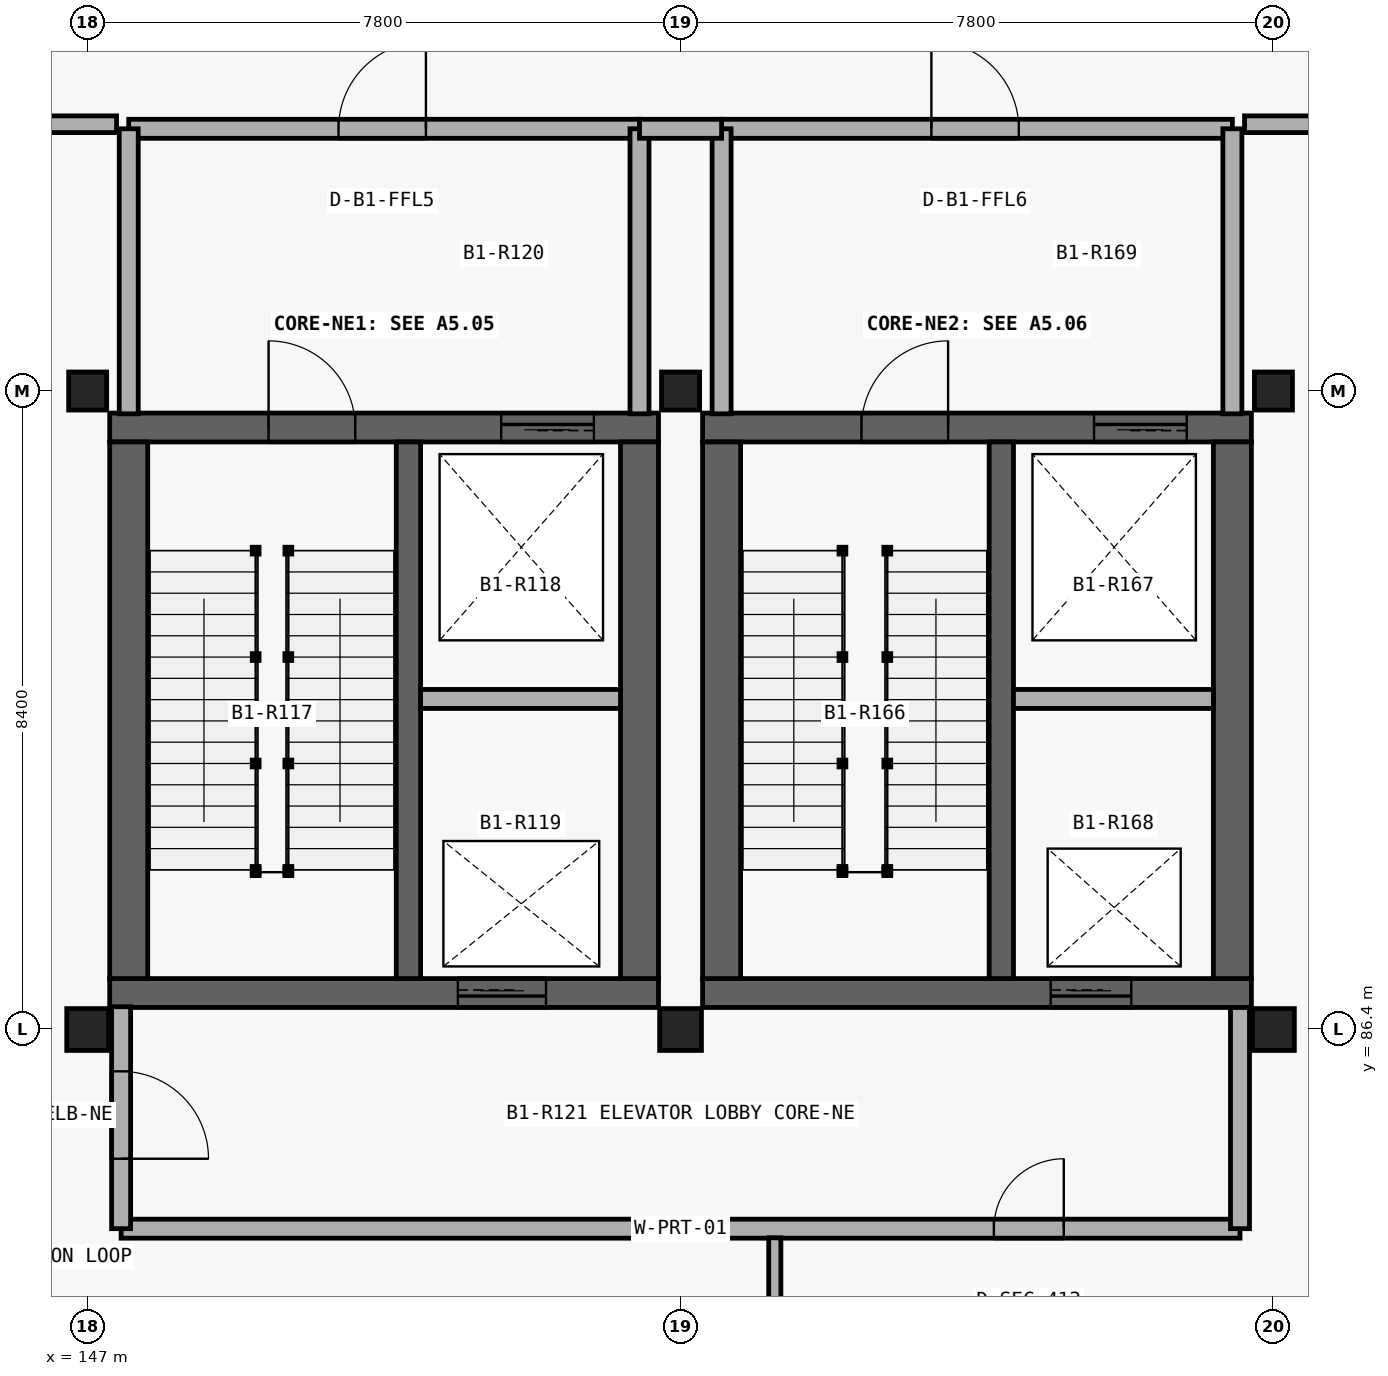
"""IFC4 building model, lengths in metres.
Left out: names, types, materials, properties, quantities, classifications, styles, units other than length and angle.
Written with IfcOpenShell. Run it as: python <this file> out.ifc"""

import sys

from ifc_helpers import new_model, si_unit, direction, frame, frame_2d, origin_with_axes, origin_2d_with_axis, place, context, subcontext, project, spatial, rectangle, i_section, extrude, element, fill, save


model = new_model("IFC4")
c1 = context("Model", 3, precision=1e-05, world=origin_with_axes(), true_north=direction((0.0, 1.0)))
c2 = subcontext(c1, "Body", "Model", "MODEL_VIEW")
j1 = project(units=[si_unit("LENGTHUNIT", "METRE"), si_unit("PLANEANGLEUNIT", "RADIAN")], contexts=[c1])
p1 = place(None, origin_with_axes())
s1 = spatial("IfcSite", under=j1, at=p1, CompositionType="ELEMENT")
p2 = place(p1, origin_with_axes())
s2 = spatial("IfcBuilding", under=s1, at=p2, CompositionType="ELEMENT")
p3 = place(p2, frame((0.0, 0.0, -4.8), z_axis=(0.0, 0.0, 1.0), x_axis=(1.0, 0.0, 0.0)))
s3 = spatial("IfcBuildingStorey", under=s2, at=p3, CompositionType="ELEMENT", Elevation=-4.8)
p4 = place(None, frame((147.29, 86.88, -5.35), z_axis=(0.0, 0.0, 1.0), x_axis=(1.0, 0.0, 0.0)))
e1 = element("IfcWall", 1, at=p4, inside=s3, PredefinedType="SHEAR", context=c2, shape_type="SweptSolid", body=[
    extrude(rectangle(XDim=7.22, YDim=0.38, at=frame_2d((3.61, 0.0), x_axis=(1.0, 0.0))), origin_with_axes(), (0.0, 0.0, 1.0), 5.35),
])
p5 = place(None, frame((152.45, 86.88, -4.8), z_axis=(0.0, 0.0, 1.0), x_axis=(1.0, 0.0, 0.0)))
e2 = element("IfcOpeningElement", 2, at=p5, cuts=e1, PredefinedType="OPENING", context=c2, shape_type="SweptSolid", body=[
    extrude(rectangle(XDim=1.16, YDim=2.2, at=frame_2d((0.0, 1.1), x_axis=(1.0, 0.0))), frame((0.0, 0.2, 0.0), z_axis=(0.0, -1.0, 0.0), x_axis=(1.0, 0.0, 0.0)), (0.0, 0.0, 1.0), 0.4),
])
p6 = place(None, frame((154.51, 94.32, -5.35), z_axis=(0.0, 0.0, 1.0), x_axis=(-1.0, 0.0, 0.0)))
e3 = element("IfcWall", 3, at=p6, inside=s3, PredefinedType="SHEAR", context=c2, shape_type="SweptSolid", body=[
    extrude(rectangle(XDim=7.22, YDim=0.38, at=frame_2d((3.61, 0.0), x_axis=(1.0, 0.0))), origin_with_axes(), (0.0, 0.0, 1.0), 5.35),
])
p7 = place(None, frame((149.95, 94.32, -4.8), z_axis=(0.0, 0.0, 1.0), x_axis=(-1.0, 0.0, 0.0)))
e4 = element("IfcOpeningElement", 4, at=p7, cuts=e3, PredefinedType="OPENING", context=c2, shape_type="SweptSolid", body=[
    extrude(rectangle(XDim=1.14, YDim=2.18, at=frame_2d((0.0, 1.09), x_axis=(1.0, 0.0))), frame((0.0, 0.2, 0.0), z_axis=(0.0, -1.0, 0.0), x_axis=(1.0, 0.0, 0.0)), (0.0, 0.0, 1.0), 0.4),
])
p8 = place(None, frame((153.05, 94.32, -4.8), z_axis=(0.0, 0.0, 1.0), x_axis=(-1.0, 0.0, 0.0)))
e5 = element("IfcOpeningElement", 5, at=p8, cuts=e3, PredefinedType="OPENING", context=c2, shape_type="SweptSolid", body=[
    extrude(rectangle(XDim=1.22, YDim=2.28, at=frame_2d((0.0, 1.14), x_axis=(1.0, 0.0))), frame((0.0, 0.2, 0.0), z_axis=(0.0, -1.0, 0.0), x_axis=(1.0, 0.0, 0.0)), (0.0, 0.0, 1.0), 0.4),
])
for number, where, z_axis, x_axis in (
    (6, (154.26, 87.07, -5.35), (0.0, 0.0, 1.0), (0.0, 1.0, 0.0)),
    (7, (147.54, 94.13, -5.35), (0.0, 0.0, 1.0), (0.0, -1.0, 0.0)),
):
    element("IfcWall", number, at=place(None, frame(where, z_axis=z_axis, x_axis=x_axis)), inside=s3, PredefinedType="SHEAR", context=c2, shape_type="SweptSolid", body=[
        extrude(rectangle(XDim=7.06, YDim=0.5, at=frame_2d((3.53, 0.0), x_axis=(1.0, 0.0))), origin_with_axes(), (0.0, 0.0, 1.0), 5.35),
    ])
p9 = place(None, frame((151.22, 87.07, -5.35), z_axis=(0.0, 0.0, 1.0), x_axis=(0.0, 1.0, 0.0)))
e8 = element("IfcWall", 8, at=p9, inside=s3, PredefinedType="SHEAR", context=c2, shape_type="SweptSolid", body=[
    extrude(rectangle(XDim=7.06, YDim=0.32, at=frame_2d((3.53, 0.0), x_axis=(1.0, 0.0))), origin_with_axes(), (0.0, 0.0, 1.0), 5.35),
])
p10 = place(None, frame((151.38, 90.749, -4.8), z_axis=(0.0, 0.0, 1.0), x_axis=(1.0, 0.0, 0.0)))
e9 = element("IfcWall", 9, at=p10, inside=s3, PredefinedType="PARTITIONING", context=c2, shape_type="SweptSolid", body=[
    extrude(rectangle(XDim=2.63, YDim=0.25, at=frame_2d((1.315, 0.0), x_axis=(1.0, 0.0))), origin_with_axes(), (0.0, 0.0, 1.0), 4.44),
])
p11 = place(None, frame((154.26, 98.25, -4.8), z_axis=(0.0, 0.0, 1.0), x_axis=(-1.0, 0.0, 0.0)))
e10 = element("IfcWall", 10, at=p11, inside=s3, PredefinedType="PARTITIONING", context=c2, shape_type="SweptSolid", body=[
    extrude(rectangle(XDim=6.72, YDim=0.25, at=frame_2d((3.36, 0.0), x_axis=(1.0, 0.0))), origin_with_axes(), (0.0, 0.0, 1.0), 4.44),
])
p12 = place(None, frame((150.875, 98.25, -4.8), z_axis=(0.0, 0.0, 1.0), x_axis=(-1.0, 0.0, 0.0)))
e11 = element("IfcOpeningElement", 11, at=p12, cuts=e10, PredefinedType="OPENING", context=c2, shape_type="SweptSolid", body=[
    extrude(rectangle(XDim=1.15, YDim=2.25, at=frame_2d((0.0, 1.125), x_axis=(1.0, 0.0))), frame((0.0, 0.135, 0.0), z_axis=(0.0, -1.0, 0.0), x_axis=(1.0, 0.0, 0.0)), (0.0, 0.0, 1.0), 0.27),
])
for number, where, z_axis, x_axis in (
    (12, (147.54, 94.5, -4.8), (0.0, 0.0, 1.0), (0.0, 1.0, 0.0)),
    (13, (154.26, 94.5, -4.8), (0.0, 0.0, 1.0), (0.0, 1.0, 0.0)),
):
    element("IfcWall", number, at=place(None, frame(where, z_axis=z_axis, x_axis=x_axis)), inside=s3, PredefinedType="PARTITIONING", context=c2, shape_type="SweptSolid", body=[
        extrude(rectangle(XDim=3.75, YDim=0.25, at=frame_2d((1.875, 0.0), x_axis=(1.0, 0.0))), origin_with_axes(), (0.0, 0.0, 1.0), 4.44),
    ])
p13 = place(None, frame((147.44, 83.78, -4.8), z_axis=(0.0, 0.0, 1.0), x_axis=(1.0, 0.0, 0.0)))
e14 = element("IfcWall", 14, at=p13, inside=s3, PredefinedType="PARTITIONING", context=c2, shape_type="SweptSolid", body=[
    extrude(rectangle(XDim=14.72, YDim=0.25, at=frame_2d((7.36, 0.0), x_axis=(1.0, 0.0))), origin_with_axes(), (0.0, 0.0, 1.0), 4.1),
])
p14 = place(None, frame((159.382, 83.78, -4.8), z_axis=(0.0, 0.0, 1.0), x_axis=(1.0, 0.0, 0.0)))
e15 = element("IfcOpeningElement", 15, at=p14, cuts=e14, PredefinedType="OPENING", context=c2, shape_type="SweptSolid", body=[
    extrude(rectangle(XDim=0.92, YDim=2.14, at=frame_2d((0.0, 1.07), x_axis=(1.0, 0.0))), frame((0.0, 0.135, 0.0), z_axis=(0.0, -1.0, 0.0), x_axis=(1.0, 0.0, 0.0)), (0.0, 0.0, 1.0), 0.27),
])
p15 = place(None, frame((162.16, 83.78, -4.8), z_axis=(0.0, 0.0, 1.0), x_axis=(0.0, 1.0, 0.0)))
e16 = element("IfcWall", 16, at=p15, inside=s3, PredefinedType="PARTITIONING", context=c2, shape_type="SweptSolid", body=[
    extrude(rectangle(XDim=2.92, YDim=0.25, at=frame_2d((1.46, 0.0), x_axis=(1.0, 0.0))), origin_with_axes(), (0.0, 0.0, 1.0), 4.44),
])
p16 = place(None, frame((147.44, 86.7, -4.8), z_axis=(0.0, 0.0, 1.0), x_axis=(0.0, -1.0, 0.0)))
e17 = element("IfcWall", 17, at=p16, inside=s3, PredefinedType="PARTITIONING", context=c2, shape_type="SweptSolid", body=[
    extrude(rectangle(XDim=2.92, YDim=0.25, at=frame_2d((1.46, 0.0), x_axis=(1.0, 0.0))), origin_with_axes(), (0.0, 0.0, 1.0), 4.44),
])
p17 = place(None, frame((147.44, 85.275, -4.8), z_axis=(0.0, 0.0, 1.0), x_axis=(0.0, -1.0, 0.0)))
e18 = element("IfcOpeningElement", 18, at=p17, cuts=e17, PredefinedType="OPENING", context=c2, shape_type="SweptSolid", body=[
    extrude(rectangle(XDim=1.15, YDim=2.25, at=frame_2d((0.0, 1.125), x_axis=(1.0, 0.0))), frame((0.0, 0.135, 0.0), z_axis=(0.0, -1.0, 0.0), x_axis=(1.0, 0.0, 0.0)), (0.0, 0.0, 1.0), 0.27),
])
p18 = place(None, frame((155.09, 86.88, -5.35), z_axis=(0.0, 0.0, 1.0), x_axis=(1.0, 0.0, 0.0)))
e19 = element("IfcWall", 19, at=p18, inside=s3, PredefinedType="SHEAR", context=c2, shape_type="SweptSolid", body=[
    extrude(rectangle(XDim=7.22, YDim=0.38, at=frame_2d((3.61, 0.0), x_axis=(1.0, 0.0))), origin_with_axes(), (0.0, 0.0, 1.0), 5.35),
])
p19 = place(None, frame((160.2, 86.88, -4.8), z_axis=(0.0, 0.0, 1.0), x_axis=(1.0, 0.0, 0.0)))
e20 = element("IfcOpeningElement", 20, at=p19, cuts=e19, PredefinedType="OPENING", context=c2, shape_type="SweptSolid", body=[
    extrude(rectangle(XDim=1.06, YDim=2.16, at=frame_2d((0.0, 1.08), x_axis=(1.0, 0.0))), frame((0.0, 0.2, 0.0), z_axis=(0.0, -1.0, 0.0), x_axis=(1.0, 0.0, 0.0)), (0.0, 0.0, 1.0), 0.4),
])
p20 = place(None, frame((162.31, 94.32, -5.35), z_axis=(0.0, 0.0, 1.0), x_axis=(-1.0, 0.0, 0.0)))
e21 = element("IfcWall", 21, at=p20, inside=s3, PredefinedType="SHEAR", context=c2, shape_type="SweptSolid", body=[
    extrude(rectangle(XDim=7.22, YDim=0.38, at=frame_2d((3.61, 0.0), x_axis=(1.0, 0.0))), origin_with_axes(), (0.0, 0.0, 1.0), 5.35),
])
p21 = place(None, frame((157.75, 94.32, -4.8), z_axis=(0.0, 0.0, 1.0), x_axis=(-1.0, 0.0, 0.0)))
e22 = element("IfcOpeningElement", 22, at=p21, cuts=e21, PredefinedType="OPENING", context=c2, shape_type="SweptSolid", body=[
    extrude(rectangle(XDim=1.14, YDim=2.18, at=frame_2d((0.0, 1.09), x_axis=(1.0, 0.0))), frame((0.0, 0.2, 0.0), z_axis=(0.0, -1.0, 0.0), x_axis=(1.0, 0.0, 0.0)), (0.0, 0.0, 1.0), 0.4),
])
p22 = place(None, frame((160.85, 94.32, -4.8), z_axis=(0.0, 0.0, 1.0), x_axis=(-1.0, 0.0, 0.0)))
e23 = element("IfcOpeningElement", 23, at=p22, cuts=e21, PredefinedType="OPENING", context=c2, shape_type="SweptSolid", body=[
    extrude(rectangle(XDim=1.22, YDim=2.28, at=frame_2d((0.0, 1.14), x_axis=(1.0, 0.0))), frame((0.0, 0.2, 0.0), z_axis=(0.0, -1.0, 0.0), x_axis=(1.0, 0.0, 0.0)), (0.0, 0.0, 1.0), 0.4),
])
for number, where, z_axis, x_axis in (
    (24, (162.06, 87.07, -5.35), (0.0, 0.0, 1.0), (0.0, 1.0, 0.0)),
    (25, (155.34, 94.13, -5.35), (0.0, 0.0, 1.0), (0.0, -1.0, 0.0)),
):
    element("IfcWall", number, at=place(None, frame(where, z_axis=z_axis, x_axis=x_axis)), inside=s3, PredefinedType="SHEAR", context=c2, shape_type="SweptSolid", body=[
        extrude(rectangle(XDim=7.06, YDim=0.5, at=frame_2d((3.53, 0.0), x_axis=(1.0, 0.0))), origin_with_axes(), (0.0, 0.0, 1.0), 5.35),
    ])
p23 = place(None, frame((159.02, 87.07, -5.35), z_axis=(0.0, 0.0, 1.0), x_axis=(0.0, 1.0, 0.0)))
e26 = element("IfcWall", 26, at=p23, inside=s3, PredefinedType="SHEAR", context=c2, shape_type="SweptSolid", body=[
    extrude(rectangle(XDim=7.06, YDim=0.32, at=frame_2d((3.53, 0.0), x_axis=(1.0, 0.0))), origin_with_axes(), (0.0, 0.0, 1.0), 5.35),
])
p24 = place(None, frame((159.18, 90.749, -4.8), z_axis=(0.0, 0.0, 1.0), x_axis=(1.0, 0.0, 0.0)))
e27 = element("IfcWall", 27, at=p24, inside=s3, PredefinedType="PARTITIONING", context=c2, shape_type="SweptSolid", body=[
    extrude(rectangle(XDim=2.63, YDim=0.25, at=frame_2d((1.315, 0.0), x_axis=(1.0, 0.0))), origin_with_axes(), (0.0, 0.0, 1.0), 4.44),
])
p25 = place(None, frame((162.06, 98.25, -4.8), z_axis=(0.0, 0.0, 1.0), x_axis=(-1.0, 0.0, 0.0)))
e28 = element("IfcWall", 28, at=p25, inside=s3, PredefinedType="PARTITIONING", context=c2, shape_type="SweptSolid", body=[
    extrude(rectangle(XDim=6.72, YDim=0.25, at=frame_2d((3.36, 0.0), x_axis=(1.0, 0.0))), origin_with_axes(), (0.0, 0.0, 1.0), 4.44),
])
p26 = place(None, frame((158.675, 98.25, -4.8), z_axis=(0.0, 0.0, 1.0), x_axis=(-1.0, 0.0, 0.0)))
e29 = element("IfcOpeningElement", 29, at=p26, cuts=e28, PredefinedType="OPENING", context=c2, shape_type="SweptSolid", body=[
    extrude(rectangle(XDim=1.15, YDim=2.25, at=frame_2d((0.0, 1.125), x_axis=(1.0, 0.0))), frame((0.0, 0.135, 0.0), z_axis=(0.0, -1.0, 0.0), x_axis=(1.0, 0.0, 0.0)), (0.0, 0.0, 1.0), 0.27),
])
for number, where, z_axis, x_axis in (
    (30, (155.34, 94.5, -4.8), (0.0, 0.0, 1.0), (0.0, 1.0, 0.0)),
    (31, (162.06, 94.5, -4.8), (0.0, 0.0, 1.0), (0.0, 1.0, 0.0)),
):
    element("IfcWall", number, at=place(None, frame(where, z_axis=z_axis, x_axis=x_axis)), inside=s3, PredefinedType="PARTITIONING", context=c2, shape_type="SweptSolid", body=[
        extrude(rectangle(XDim=3.75, YDim=0.25, at=frame_2d((1.875, 0.0), x_axis=(1.0, 0.0))), origin_with_axes(), (0.0, 0.0, 1.0), 4.44),
    ])
p27 = place(None, frame((154.26, 98.25, -4.8), z_axis=(0.0, 0.0, 1.0), x_axis=(1.0, 0.0, 0.0)))
e32 = element("IfcWall", 32, at=p27, inside=s3, PredefinedType="PARTITIONING", context=c2, shape_type="SweptSolid", body=[
    extrude(rectangle(XDim=1.08, YDim=0.25, at=frame_2d((0.54, 0.0), x_axis=(1.0, 0.0))), origin_with_axes(), (0.0, 0.0, 1.0), 4.44),
])
p28 = place(None, frame((145.7, 98.31, -4.8), z_axis=(0.0, 0.0, 1.0), x_axis=(1.0, 0.0, 0.0)))
e33 = element("IfcWall", 33, at=p28, inside=s3, PredefinedType="PARTITIONING", context=c2, shape_type="SweptSolid", body=[
    extrude(rectangle(XDim=1.68, YDim=0.22, at=frame_2d((0.84, 0.0), x_axis=(1.0, 0.0))), origin_with_axes(), (0.0, 0.0, 1.0), 4.44),
])
p29 = place(None, frame((162.22, 98.31, -4.8), z_axis=(0.0, 0.0, 1.0), x_axis=(1.0, 0.0, 0.0)))
e34 = element("IfcWall", 34, at=p29, inside=s3, PredefinedType="PARTITIONING", context=c2, shape_type="SweptSolid", body=[
    extrude(rectangle(XDim=7.04, YDim=0.22, at=frame_2d((3.52, 0.0), x_axis=(1.0, 0.0))), origin_with_axes(), (0.0, 0.0, 1.0), 4.44),
])
p30 = place(None, frame((156.04, 29.49, -4.8), z_axis=(0.0, 0.0, 1.0), x_axis=(0.0, 1.0, 0.0)))
e35 = element("IfcWall", 35, at=p30, inside=s3, PredefinedType="PARTITIONING", context=c2, shape_type="SweptSolid", body=[
    extrude(rectangle(XDim=54.17, YDim=0.16, at=frame_2d((27.085, 0.0), x_axis=(1.0, 0.0))), origin_with_axes(), (0.0, 0.0, 1.0), 4.44),
])
p31 = place(None, frame((147.0, 86.4, -5.35), z_axis=(0.0, 0.0, 1.0), x_axis=(1.0, 0.0, 0.0)))
e36 = element("IfcColumn", 36, at=p31, inside=s3, PredefinedType="COLUMN", context=c2, shape_type="SweptSolid", body=[
    extrude(i_section(OverallWidth=0.55, OverallDepth=0.55, WebThickness=0.025, FlangeThickness=0.042, at=origin_2d_with_axis()), origin_with_axes(), (0.0, 0.0, 1.0), 5.35),
])
p32 = place(None, frame((147.0, 94.8, -5.35), z_axis=(0.0, 0.0, 1.0), x_axis=(1.0, 0.0, 0.0)))
e37 = element("IfcColumn", 37, at=p32, inside=s3, PredefinedType="COLUMN", context=c2, shape_type="SweptSolid", body=[
    extrude(i_section(OverallWidth=0.5, OverallDepth=0.5, WebThickness=0.022, FlangeThickness=0.036, at=origin_2d_with_axis()), origin_with_axes(), (0.0, 0.0, 1.0), 5.35),
])
p33 = place(None, frame((154.8, 86.4, -5.35), z_axis=(0.0, 0.0, 1.0), x_axis=(1.0, 0.0, 0.0)))
e38 = element("IfcColumn", 38, at=p33, inside=s3, PredefinedType="COLUMN", context=c2, shape_type="SweptSolid", body=[
    extrude(i_section(OverallWidth=0.55, OverallDepth=0.55, WebThickness=0.025, FlangeThickness=0.042, at=origin_2d_with_axis()), origin_with_axes(), (0.0, 0.0, 1.0), 5.35),
])
p34 = place(None, frame((154.8, 94.8, -5.35), z_axis=(0.0, 0.0, 1.0), x_axis=(1.0, 0.0, 0.0)))
e39 = element("IfcColumn", 39, at=p34, inside=s3, PredefinedType="COLUMN", context=c2, shape_type="SweptSolid", body=[
    extrude(i_section(OverallWidth=0.5, OverallDepth=0.5, WebThickness=0.022, FlangeThickness=0.036, at=origin_2d_with_axis()), origin_with_axes(), (0.0, 0.0, 1.0), 5.35),
])
p35 = place(None, frame((162.6, 86.4, -5.35), z_axis=(0.0, 0.0, 1.0), x_axis=(1.0, 0.0, 0.0)))
e40 = element("IfcColumn", 40, at=p35, inside=s3, PredefinedType="COLUMN", context=c2, shape_type="SweptSolid", body=[
    extrude(i_section(OverallWidth=0.55, OverallDepth=0.55, WebThickness=0.025, FlangeThickness=0.042, at=origin_2d_with_axis()), origin_with_axes(), (0.0, 0.0, 1.0), 5.35),
])
p36 = place(None, frame((162.6, 94.8, -5.35), z_axis=(0.0, 0.0, 1.0), x_axis=(1.0, 0.0, 0.0)))
e41 = element("IfcColumn", 41, at=p36, inside=s3, PredefinedType="COLUMN", context=c2, shape_type="SweptSolid", body=[
    extrude(i_section(OverallWidth=0.5, OverallDepth=0.5, WebThickness=0.022, FlangeThickness=0.036, at=origin_2d_with_axis()), origin_with_axes(), (0.0, 0.0, 1.0), 5.35),
])
p37 = place(None, frame((149.95, 94.32, -4.8), z_axis=(0.0, 0.0, 1.0), x_axis=(1.0, 0.0, 0.0)))
e42 = element("IfcDoor", 42, at=p37, inside=s3, OperationType="SINGLE_SWING_RIGHT", PredefinedType="DOOR", context=c2, shape_type="SweptSolid", body=[
    extrude(rectangle(XDim=1.14, YDim=2.18, at=frame_2d((0.0, 1.09), x_axis=(1.0, 0.0))), frame((0.0, 0.04, 0.0), z_axis=(0.0, -1.0, 0.0), x_axis=(1.0, 0.0, 0.0)), (0.0, 0.0, 1.0), 0.08),
])
fill(e4, e42)
p38 = place(None, frame((153.05, 94.32, -4.8), z_axis=(0.0, 0.0, 1.0), x_axis=(1.0, 0.0, 0.0)))
e43 = element("IfcDoor", 43, at=p38, inside=s3, OperationType="SLIDING_TO_LEFT", PredefinedType="DOOR", context=c2, shape_type="SweptSolid", body=[
    extrude(rectangle(XDim=1.22, YDim=2.28, at=frame_2d((0.0, 1.14), x_axis=(1.0, 0.0))), frame((0.0, 0.04, 0.0), z_axis=(0.0, -1.0, 0.0), x_axis=(1.0, 0.0, 0.0)), (0.0, 0.0, 1.0), 0.08),
])
fill(e5, e43)
p39 = place(None, frame((152.45, 86.88, -4.8), z_axis=(0.0, 0.0, 1.0), x_axis=(-1.0, 0.0, 0.0)))
e44 = element("IfcDoor", 44, at=p39, inside=s3, OperationType="SLIDING_TO_LEFT", PredefinedType="DOOR", context=c2, shape_type="SweptSolid", body=[
    extrude(rectangle(XDim=1.16, YDim=2.2, at=frame_2d((0.0, 1.1), x_axis=(1.0, 0.0))), frame((0.0, 0.04, 0.0), z_axis=(0.0, -1.0, 0.0), x_axis=(1.0, 0.0, 0.0)), (0.0, 0.0, 1.0), 0.08),
])
fill(e2, e44)
p40 = place(None, frame((150.875, 98.25, -4.8), z_axis=(0.0, 0.0, 1.0), x_axis=(1.0, 0.0, 0.0)))
e45 = element("IfcDoor", 45, at=p40, inside=s3, OperationType="SINGLE_SWING_LEFT", PredefinedType="DOOR", context=c2, shape_type="SweptSolid", body=[
    extrude(rectangle(XDim=1.15, YDim=2.25, at=frame_2d((0.0, 1.125), x_axis=(1.0, 0.0))), frame((0.0, 0.04, 0.0), z_axis=(0.0, -1.0, 0.0), x_axis=(1.0, 0.0, 0.0)), (0.0, 0.0, 1.0), 0.08),
])
fill(e11, e45)
p41 = place(None, frame((147.44, 85.275, -4.8), z_axis=(0.0, 0.0, 1.0), x_axis=(0.0, -1.0, 0.0)))
e46 = element("IfcDoor", 46, at=p41, inside=s3, OperationType="SINGLE_SWING_RIGHT", PredefinedType="DOOR", context=c2, shape_type="SweptSolid", body=[
    extrude(rectangle(XDim=1.15, YDim=2.25, at=frame_2d((0.0, 1.125), x_axis=(1.0, 0.0))), frame((0.0, 0.04, 0.0), z_axis=(0.0, -1.0, 0.0), x_axis=(1.0, 0.0, 0.0)), (0.0, 0.0, 1.0), 0.08),
])
fill(e18, e46)
p42 = place(None, frame((157.75, 94.32, -4.8), z_axis=(0.0, 0.0, 1.0), x_axis=(1.0, 0.0, 0.0)))
e47 = element("IfcDoor", 47, at=p42, inside=s3, OperationType="SINGLE_SWING_LEFT", PredefinedType="DOOR", context=c2, shape_type="SweptSolid", body=[
    extrude(rectangle(XDim=1.14, YDim=2.18, at=frame_2d((0.0, 1.09), x_axis=(1.0, 0.0))), frame((0.0, 0.04, 0.0), z_axis=(0.0, -1.0, 0.0), x_axis=(1.0, 0.0, 0.0)), (0.0, 0.0, 1.0), 0.08),
])
fill(e22, e47)
p43 = place(None, frame((160.85, 94.32, -4.8), z_axis=(0.0, 0.0, 1.0), x_axis=(1.0, 0.0, 0.0)))
e48 = element("IfcDoor", 48, at=p43, inside=s3, OperationType="SLIDING_TO_LEFT", PredefinedType="DOOR", context=c2, shape_type="SweptSolid", body=[
    extrude(rectangle(XDim=1.22, YDim=2.28, at=frame_2d((0.0, 1.14), x_axis=(1.0, 0.0))), frame((0.0, 0.04, 0.0), z_axis=(0.0, -1.0, 0.0), x_axis=(1.0, 0.0, 0.0)), (0.0, 0.0, 1.0), 0.08),
])
fill(e23, e48)
p44 = place(None, frame((160.2, 86.88, -4.8), z_axis=(0.0, 0.0, 1.0), x_axis=(-1.0, 0.0, 0.0)))
e49 = element("IfcDoor", 49, at=p44, inside=s3, OperationType="SLIDING_TO_LEFT", PredefinedType="DOOR", context=c2, shape_type="SweptSolid", body=[
    extrude(rectangle(XDim=1.06, YDim=2.16, at=frame_2d((0.0, 1.08), x_axis=(1.0, 0.0))), frame((0.0, 0.04, 0.0), z_axis=(0.0, -1.0, 0.0), x_axis=(1.0, 0.0, 0.0)), (0.0, 0.0, 1.0), 0.08),
])
fill(e20, e49)
p45 = place(None, frame((158.675, 98.25, -4.8), z_axis=(0.0, 0.0, 1.0), x_axis=(1.0, 0.0, 0.0)))
e50 = element("IfcDoor", 50, at=p45, inside=s3, OperationType="SINGLE_SWING_RIGHT", PredefinedType="DOOR", context=c2, shape_type="SweptSolid", body=[
    extrude(rectangle(XDim=1.15, YDim=2.25, at=frame_2d((0.0, 1.125), x_axis=(1.0, 0.0))), frame((0.0, 0.04, 0.0), z_axis=(0.0, -1.0, 0.0), x_axis=(1.0, 0.0, 0.0)), (0.0, 0.0, 1.0), 0.08),
])
fill(e29, e50)
p46 = place(None, frame((159.382, 83.78, -4.8), z_axis=(0.0, 0.0, 1.0), x_axis=(1.0, 0.0, 0.0)))
e51 = element("IfcDoor", 51, at=p46, inside=s3, OperationType="SINGLE_SWING_RIGHT", PredefinedType="DOOR", context=c2, shape_type="SweptSolid", body=[
    extrude(rectangle(XDim=0.92, YDim=2.14, at=frame_2d((0.0, 1.07), x_axis=(1.0, 0.0))), frame((0.0, 0.04, 0.0), z_axis=(0.0, -1.0, 0.0), x_axis=(1.0, 0.0, 0.0)), (0.0, 0.0, 1.0), 0.08),
])
fill(e15, e51)
save(model, sys.argv[1])
